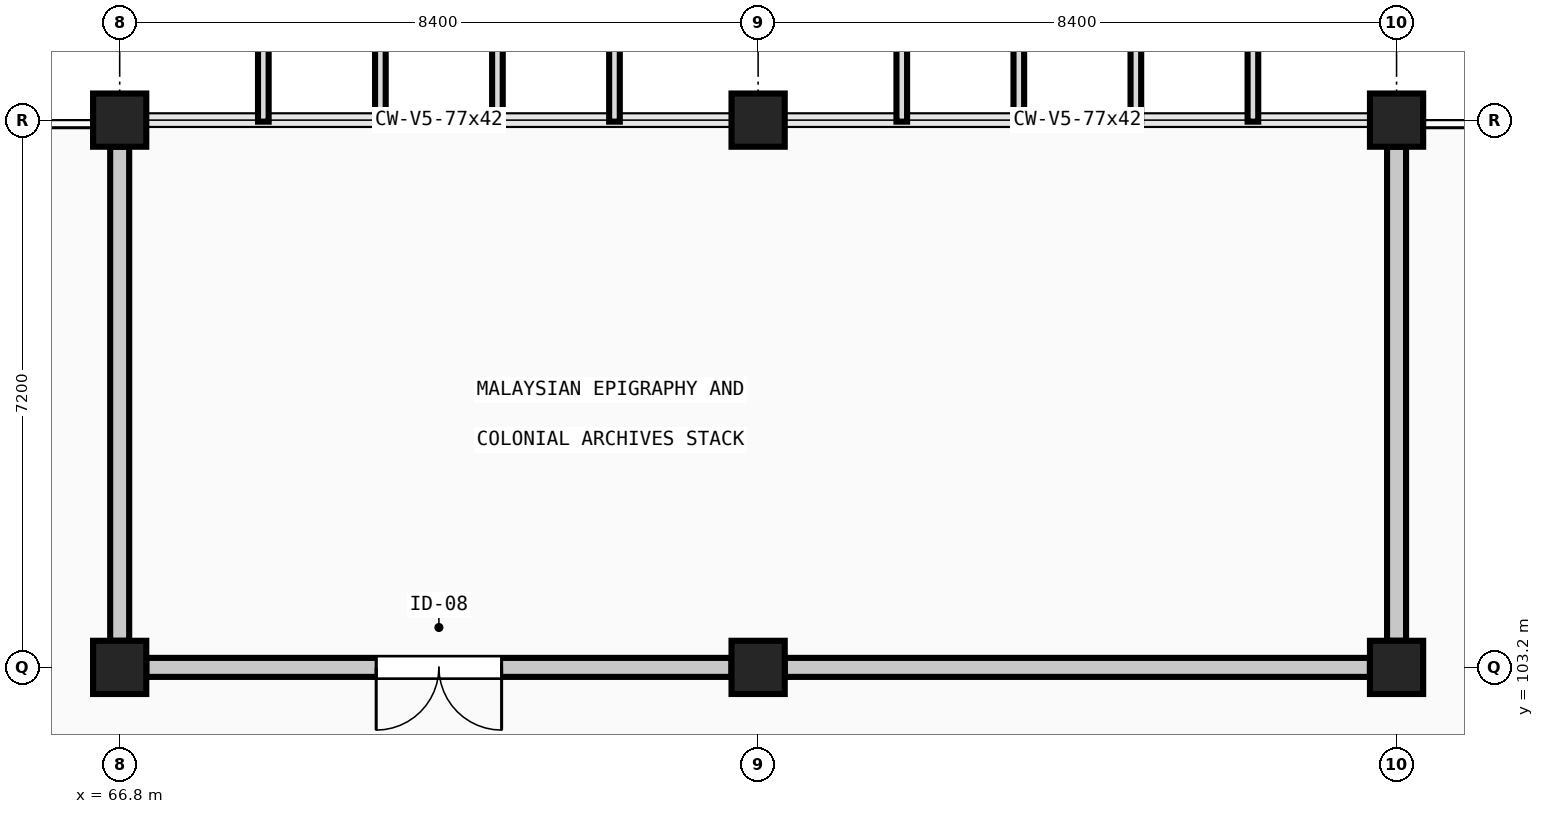
"""IFC4 building model, lengths in metres.
Left out: names, types, materials, properties, quantities, classifications, styles, units other than length and angle.
Written with IfcOpenShell. Run it as: python <this file> out.ifc"""

import sys

from ifc_helpers import new_model, si_unit, direction, frame, frame_2d, origin, origin_2d, place, context, subcontext, project, spatial, rectangle, extrude, element, fill, save


model = new_model("IFC4")
c1 = context("Model", 3, precision=1e-05, world=origin(), true_north=direction((0.0, 1.0)))
c2 = subcontext(c1, "Body", "Model", "MODEL_VIEW")
j1 = project(units=[si_unit("LENGTHUNIT", "METRE"), si_unit("PLANEANGLEUNIT", "RADIAN")], contexts=[c1])
p1 = place(None, origin())
s1 = spatial("IfcSite", under=j1, at=p1, CompositionType="ELEMENT")
p2 = place(p1, origin())
s2 = spatial("IfcBuilding", under=s1, at=p2, CompositionType="ELEMENT")
p3 = place(p2, frame((0.0, 0.0, 23.36)))
s3 = spatial("IfcBuildingStorey", under=s2, at=p3, CompositionType="ELEMENT", Elevation=23.36)
for number, where, z_axis, x_axis in (
    (1, (66.8, 103.2, 0.0), (0.0, 0.0, 1.0), (1.0, 0.0, 0.0)),
    (2, (66.8, 110.4, 0.0), (0.0, 0.0, 1.0), (1.0, 0.0, 0.0)),
    (3, (75.2, 103.2, 0.0), (0.0, 0.0, 1.0), (1.0, 0.0, 0.0)),
    (4, (75.2, 110.4, 0.0), (0.0, 0.0, 1.0), (1.0, 0.0, 0.0)),
    (5, (83.6, 103.2, 0.0), (0.0, 0.0, 1.0), (1.0, 0.0, 0.0)),
    (6, (83.6, 110.4, 0.0), (0.0, 0.0, 1.0), (1.0, 0.0, 0.0)),
):
    element("IfcColumn", number, at=place(p3, frame(where, z_axis=z_axis, x_axis=x_axis)), inside=s3, PredefinedType="COLUMN", context=c2, shape_type="SweptSolid", body=[
        extrude(rectangle(XDim=0.7, YDim=0.7, at=origin_2d()), origin(), (0.0, 0.0, 1.0), 4.48),
    ])
p4 = place(p3, frame((83.25, 103.2, 0.0), z_axis=(0.0, 0.0, 1.0), x_axis=(-1.0, 0.0, 0.0)))
e7 = element("IfcWall", 7, at=p4, inside=s3, PredefinedType="SOLIDWALL", context=c2, shape_type="SweptSolid", body=[
    extrude(rectangle(XDim=7.7, YDim=0.25, at=frame_2d((3.85, 0.0))), origin(), (0.0, 0.0, 1.0), 3.53),
])
p5 = place(p3, frame((74.85, 103.2, 0.0), z_axis=(0.0, 0.0, 1.0), x_axis=(-1.0, 0.0, 0.0)))
e8 = element("IfcWall", 8, at=p5, inside=s3, PredefinedType="SOLIDWALL", context=c2, shape_type="SweptSolid", body=[
    extrude(rectangle(XDim=7.7, YDim=0.25, at=frame_2d((3.85, 0.0))), origin(), (0.0, 0.0, 1.0), 3.53),
])
p6 = place(p5, frame((3.025, 0.0, 0.0)))
e9 = element("IfcOpeningElement", 9, at=p6, cuts=e8, PredefinedType="OPENING", context=c2, shape_type="SweptSolid", body=[
    extrude(rectangle(XDim=1.65, YDim=2.25, at=frame_2d((0.825, 1.125))), frame((0.0, 0.135, 0.0), z_axis=(0.0, -1.0, 0.0), x_axis=(1.0, 0.0, 0.0)), (0.0, 0.0, 1.0), 0.27),
])
for number, where, z_axis, x_axis in (
    (10, (66.8, 103.55, 0.0), (0.0, 0.0, 1.0), (0.0, 1.0, 0.0)),
    (11, (83.6, 110.05, 0.0), (0.0, 0.0, 1.0), (0.0, -1.0, 0.0)),
):
    element("IfcWall", number, at=place(p3, frame(where, z_axis=z_axis, x_axis=x_axis)), inside=s3, PredefinedType="SOLIDWALL", context=c2, shape_type="SweptSolid", body=[
        extrude(rectangle(XDim=6.5, YDim=0.25, at=frame_2d((3.25, 0.0))), origin(), (0.0, 0.0, 1.0), 3.53),
    ])
p7 = place(p6, origin())
e12 = element("IfcDoor", 12, at=p7, inside=s3, OperationType="DOUBLE_DOOR_SINGLE_SWING", PredefinedType="DOOR", context=c2, shape_type="SweptSolid", body=[
    extrude(rectangle(XDim=1.65, YDim=2.25, at=frame_2d((0.825, 1.125))), frame((0.0, 0.025, 0.0), z_axis=(0.0, -1.0, 0.0), x_axis=(1.0, 0.0, 0.0)), (0.0, 0.0, 1.0), 0.05),
])
fill(e9, e12)
save(model, sys.argv[1])
